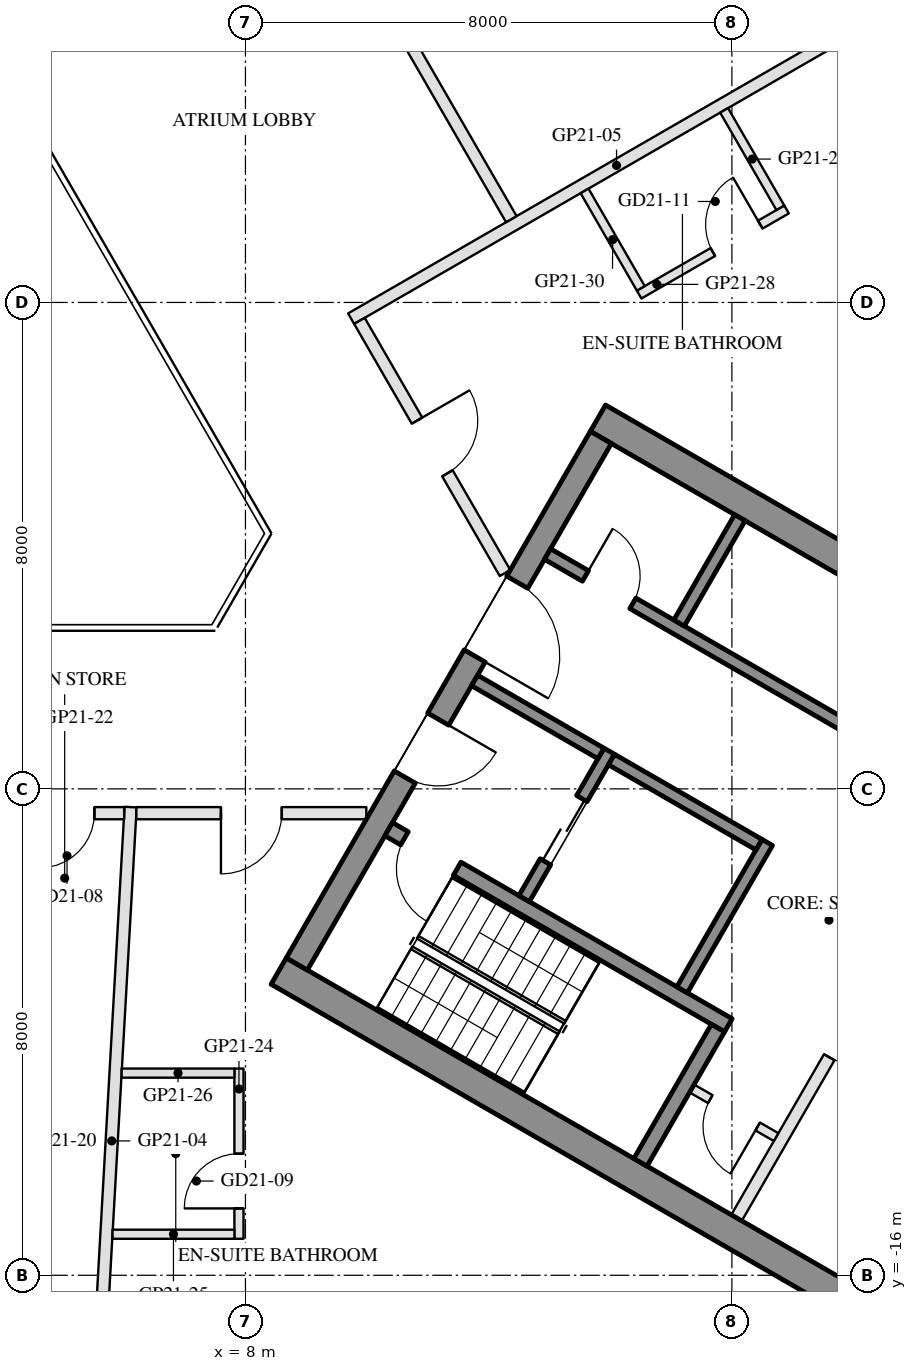
"""IFC4 building model, lengths in metres.
Left out: names, types, materials, properties, quantities, classifications, styles, units other than length and angle.
Written with IfcOpenShell. Run it as: python <this file> out.ifc"""

import sys

from ifc_helpers import new_model, si_unit, direction, frame, frame_2d, origin, place, context, subcontext, project, spatial, rectangle, extrude, element, fill, save


model = new_model("IFC4")
c1 = context("Model", 3, precision=1e-05, world=origin(), true_north=direction((0.0, 1.0)))
c2 = subcontext(c1, "Body", "Model", "MODEL_VIEW")
j1 = project(units=[si_unit("LENGTHUNIT", "METRE"), si_unit("PLANEANGLEUNIT", "RADIAN")], contexts=[c1])
p1 = place(None, origin())
s1 = spatial("IfcSite", under=j1, at=p1, CompositionType="ELEMENT")
p2 = place(p1, origin())
s2 = spatial("IfcBuilding", under=s1, at=p2, CompositionType="ELEMENT")
p3 = place(p2, frame((0.0, 0.0, 216.9)))
s3 = spatial("IfcBuildingStorey", under=s2, at=p3, CompositionType="ELEMENT", Elevation=216.9)
p4 = place(p3, frame((19.729, 2.938, 0.0), z_axis=(0.0, 0.0, 1.0), x_axis=(-0.499976430342, 0.866039011305, 0.0)))
e1 = element("IfcWall", 1, at=p4, inside=s3, PredefinedType="SOLIDWALL", context=c2, shape_type="SweptSolid", body=[
    extrude(rectangle(XDim=6.74, YDim=0.35, at=frame_2d((3.37, 0.0))), origin(), (0.0, 0.0, 1.0), 3.55),
])
p5 = place(p4, frame((0.77, 0.0, 0.3)))
e2 = element("IfcOpeningElement", 2, at=p5, cuts=e1, PredefinedType="OPENING", context=c2, shape_type="SweptSolid", body=[
    extrude(rectangle(XDim=0.9, YDim=2.65, at=frame_2d((0.45, 1.325))), frame((0.0, 0.185, 0.0), z_axis=(0.0, -1.0, 0.0), x_axis=(1.0, 0.0, 0.0)), (0.0, 0.0, 1.0), 0.37),
])
p6 = place(p4, frame((3.12, 0.0, 0.0)))
e3 = element("IfcOpeningElement", 3, at=p6, cuts=e1, PredefinedType="OPENING", context=c2, shape_type="SweptSolid", body=[
    extrude(rectangle(XDim=2.4, YDim=2.4, at=frame_2d((1.2, 1.2))), frame((0.0, 0.185, 0.0), z_axis=(0.0, -1.0, 0.0), x_axis=(1.0, 0.0, 0.0)), (0.0, 0.0, 1.0), 0.37),
])
for number, where, z_axis, x_axis in (
    (4, (8.547, -10.997, 0.0), (0.0, 0.0, 1.0), (0.866, -0.5, 0.0)),
    (5, (13.797, -1.903, 0.0), (0.0, 0.0, 1.0), (0.866, -0.5, 0.0)),
):
    element("IfcWall", number, at=place(p3, frame(where, z_axis=z_axis, x_axis=x_axis)), inside=s3, PredefinedType="SHEAR", context=c2, shape_type="SweptSolid", body=[
        extrude(rectangle(XDim=14.837, YDim=0.5, at=frame_2d((7.418, 0.0))), origin(), (0.0, 0.0, 1.0), 3.5),
    ])
p7 = place(p3, frame((8.845, -10.88, 0.0), z_axis=(0.0, 0.0, 1.0), x_axis=(0.500004234368, 0.866022959057, 0.0)))
e6 = element("IfcWall", 6, at=p7, inside=s3, PredefinedType="SHEAR", context=c2, shape_type="SweptSolid", body=[
    extrude(rectangle(XDim=10.0, YDim=0.4, at=frame_2d((5.0, 0.0))), origin(), (0.0, 0.0, 1.0), 3.5),
])
p8 = place(p7, frame((3.55, 0.0, 0.0)))
e7 = element("IfcOpeningElement", 7, at=p8, cuts=e6, PredefinedType="OPENING", context=c2, shape_type="SweptSolid", body=[
    extrude(rectangle(XDim=1.1, YDim=2.1, at=frame_2d((0.55, 1.05))), frame((0.0, 0.21, 0.0), z_axis=(0.0, -1.0, 0.0), x_axis=(1.0, 0.0, 0.0)), (0.0, 0.0, 1.0), 0.42),
])
p9 = place(p7, frame((5.85, 0.0, 0.0)))
e8 = element("IfcOpeningElement", 8, at=p9, cuts=e6, PredefinedType="OPENING", context=c2, shape_type="SweptSolid", body=[
    extrude(rectangle(XDim=1.4, YDim=2.1, at=frame_2d((0.7, 1.05))), frame((0.0, 0.21, 0.0), z_axis=(0.0, -1.0, 0.0), x_axis=(1.0, 0.0, 0.0)), (0.0, 0.0, 1.0), 0.42),
])
p10 = place(p3, frame((10.356, -8.664, 0.0), z_axis=(0.0, 0.0, 1.0), x_axis=(0.866028629588, -0.499994412703, 0.0)))
e9 = element("IfcWall", 9, at=p10, inside=s3, PredefinedType="SHEAR", context=c2, shape_type="SweptSolid", body=[
    extrude(rectangle(XDim=6.45, YDim=0.25, at=frame_2d((3.225, 0.0))), origin(), (0.0, 0.0, 1.0), 3.5),
])
p11 = place(p10, frame((0.3, 0.0, 0.0)))
e10 = element("IfcOpeningElement", 10, at=p11, cuts=e9, PredefinedType="OPENING", context=c2, shape_type="SweptSolid", body=[
    extrude(rectangle(XDim=1.0, YDim=2.1, at=frame_2d((0.5, 1.05))), frame((0.0, 0.135, 0.0), z_axis=(0.0, -1.0, 0.0), x_axis=(1.0, 0.0, 0.0)), (0.0, 0.0, 1.0), 0.27),
])
p12 = place(p3, frame((14.496, -14.143, 0.0), z_axis=(0.0, 0.0, 1.0), x_axis=(0.500062241894, 0.865989465428, 0.0)))
e11 = element("IfcWall", 11, at=p12, inside=s3, PredefinedType="SHEAR", context=c2, shape_type="SweptSolid", body=[
    extrude(rectangle(XDim=2.55, YDim=0.25, at=frame_2d((1.275, 0.0))), origin(), (0.0, 0.0, 1.0), 3.5),
])
p13 = place(p3, frame((15.181, -11.305, 0.0), z_axis=(0.0, 0.0, 1.0), x_axis=(0.49994636267, 0.866056369097, 0.0)))
e12 = element("IfcWall", 12, at=p13, inside=s3, PredefinedType="SHEAR", context=c2, shape_type="SweptSolid", body=[
    extrude(rectangle(XDim=2.8, YDim=0.2, at=frame_2d((1.4, 0.0))), origin(), (0.0, 0.0, 1.0), 3.5),
])
p14 = place(p3, frame((12.583, -9.805, 0.0), z_axis=(0.0, 0.0, 1.0), x_axis=(0.49994636267, 0.866056369097, 0.0)))
e13 = element("IfcWall", 13, at=p14, inside=s3, PredefinedType="SHEAR", context=c2, shape_type="SweptSolid", body=[
    extrude(rectangle(XDim=2.8, YDim=0.2, at=frame_2d((1.4, 0.0))), origin(), (0.0, 0.0, 1.0), 3.5),
])
p15 = place(p14, frame((0.7, 0.0, 0.0)))
e14 = element("IfcOpeningElement", 14, at=p15, cuts=e13, PredefinedType="OPENING", context=c2, shape_type="SweptSolid", body=[
    extrude(rectangle(XDim=1.2, YDim=2.1, at=frame_2d((0.6, 1.05))), frame((0.0, 0.11, 0.0), z_axis=(0.0, -1.0, 0.0), x_axis=(1.0, 0.0, 0.0)), (0.0, 0.0, 1.0), 0.22),
])
p16 = place(p3, frame((11.768, -6.217, 0.0), z_axis=(0.0, 0.0, 1.0), x_axis=(0.866050077142, -0.499957262057, 0.0)))
e15 = element("IfcWall", 15, at=p16, inside=s3, PredefinedType="SHEAR", context=c2, shape_type="SweptSolid", body=[
    extrude(rectangle(XDim=2.4, YDim=0.2, at=frame_2d((1.2, 0.0))), origin(), (0.0, 0.0, 1.0), 3.5),
])
p17 = place(p3, frame((14.02, -7.517, 0.0), z_axis=(0.0, 0.0, 1.0), x_axis=(0.866034573852, -0.49998411664, 0.0)))
e16 = element("IfcWall", 16, at=p17, inside=s3, PredefinedType="SHEAR", context=c2, shape_type="SweptSolid", body=[
    extrude(rectangle(XDim=2.8, YDim=0.2, at=frame_2d((1.4, 0.0))), origin(), (0.0, 0.0, 1.0), 3.5),
])
p18 = place(p3, frame((12.968, -4.138, 0.0), z_axis=(0.0, 0.0, 1.0), x_axis=(0.866028328073, -0.49999493495, 0.0)))
e17 = element("IfcWall", 17, at=p18, inside=s3, PredefinedType="SHEAR", context=c2, shape_type="SweptSolid", body=[
    extrude(rectangle(XDim=10.16, YDim=0.2, at=frame_2d((5.08, 0.0))), origin(), (0.0, 0.0, 1.0), 3.5),
])
p19 = place(p18, frame((0.72, 0.0, 0.0)))
e18 = element("IfcOpeningElement", 18, at=p19, cuts=e17, PredefinedType="OPENING", context=c2, shape_type="SweptSolid", body=[
    extrude(rectangle(XDim=0.9, YDim=2.1, at=frame_2d((0.45, 1.05))), frame((0.0, 0.11, 0.0), z_axis=(0.0, -1.0, 0.0), x_axis=(1.0, 0.0, 0.0)), (0.0, 0.0, 1.0), 0.22),
])
p20 = place(p18, frame((5.8, 0.0, 0.0)))
e19 = element("IfcOpeningElement", 19, at=p20, cuts=e17, PredefinedType="OPENING", context=c2, shape_type="SweptSolid", body=[
    extrude(rectangle(XDim=0.9, YDim=2.1, at=frame_2d((0.45, 1.05))), frame((0.0, 0.11, 0.0), z_axis=(0.0, -1.0, 0.0), x_axis=(1.0, 0.0, 0.0)), (0.0, 0.0, 1.0), 0.22),
])
p21 = place(p3, frame((15.131, -5.272, 0.0), z_axis=(0.0, 0.0, 1.0), x_axis=(0.499972520799, 0.866041268327, 0.0)))
e20 = element("IfcWall", 20, at=p21, inside=s3, PredefinedType="SHEAR", context=c2, shape_type="SweptSolid", body=[
    extrude(rectangle(XDim=2.0, YDim=0.2, at=frame_2d((1.0, 0.0))), origin(), (0.0, 0.0, 1.0), 3.5),
])
p22 = place(p3, frame((16.076, -15.055, 0.0), z_axis=(0.0, 0.0, 1.0), x_axis=(0.499995103361, 0.866028230842, 0.0)))
e21 = element("IfcWall", 21, at=p22, inside=s3, PredefinedType="PARTITIONING", context=c2, shape_type="SweptSolid", body=[
    extrude(rectangle(XDim=5.4, YDim=0.2, at=frame_2d((2.7, 0.0))), origin(), (0.0, 0.0, 1.0), 3.5),
])
p23 = place(p22, frame((3.05, 0.0, 0.0)))
e22 = element("IfcOpeningElement", 22, at=p23, cuts=e21, PredefinedType="OPENING", context=c2, shape_type="SweptSolid", body=[
    extrude(rectangle(XDim=0.9, YDim=2.1, at=frame_2d((0.45, 1.05))), frame((0.0, 0.11, 0.0), z_axis=(0.0, -1.0, 0.0), x_axis=(1.0, 0.0, 0.0)), (0.0, 0.0, 1.0), 0.22),
])
p24 = place(p3, frame((15.342, -12.928, 0.0), z_axis=(0.0, 0.0, 1.0), x_axis=(0.865989903783, -0.500061482766, 0.0)))
e23 = element("IfcWall", 23, at=p24, inside=s3, PredefinedType="PARTITIONING", context=c2, shape_type="SweptSolid", body=[
    extrude(rectangle(XDim=1.6, YDim=0.15, at=frame_2d((0.8, 0.0))), origin(), (0.0, 0.0, 1.0), 3.5),
])
p25 = place(p24, frame((0.35, 0.0, 0.0)))
e24 = element("IfcOpeningElement", 24, at=p25, cuts=e23, PredefinedType="OPENING", context=c2, shape_type="SweptSolid", body=[
    extrude(rectangle(XDim=0.9, YDim=2.1, at=frame_2d((0.45, 1.05))), frame((0.0, 0.085, 0.0), z_axis=(0.0, -1.0, 0.0), x_axis=(1.0, 0.0, 0.0)), (0.0, 0.0, 1.0), 0.17),
])
p26 = place(p3, frame((5.49, -19.28, 0.0), z_axis=(0.0, 0.0, 1.0), x_axis=(0.056497863711, 0.998402720046, 0.0)))
e25 = element("IfcWall", 25, at=p26, inside=s3, PredefinedType="PARTITIONING", context=c2, shape_type="SweptSolid", body=[
    extrude(rectangle(XDim=10.998, YDim=0.2, at=frame_2d((5.499, 0.0))), origin(), (0.0, 0.0, 1.0), 3.06),
])
p27 = place(p3, frame((18.468, 4.773, 0.0), z_axis=(0.0, 0.0, 1.0), x_axis=(-0.866033125095, -0.499986626058, 0.0)))
e26 = element("IfcWall", 26, at=p27, inside=s3, PredefinedType="PARTITIONING", context=c2, shape_type="SweptSolid", body=[
    extrude(rectangle(XDim=10.08, YDim=0.2, at=frame_2d((5.04, 0.0))), origin(), (0.0, 0.0, 1.0), 3.06),
])
p28 = place(p3, frame((6.006, -8.4, 0.0), z_axis=(0.0, 0.0, 1.0), x_axis=(-1.0, 0.0, 0.0)))
e27 = element("IfcWall", 27, at=p28, inside=s3, PredefinedType="PARTITIONING", context=c2, shape_type="SweptSolid", body=[
    extrude(rectangle(XDim=1.879, YDim=0.2, at=frame_2d((0.939, 0.0))), origin(), (0.0, 0.0, 1.0), 3.55),
])
p29 = place(p28, frame((0.49, 0.0, 0.0)))
e28 = element("IfcOpeningElement", 28, at=p29, cuts=e27, PredefinedType="OPENING", context=c2, shape_type="SweptSolid", body=[
    extrude(rectangle(XDim=0.9, YDim=2.1, at=frame_2d((0.45, 1.05))), frame((0.0, 0.11, 0.0), z_axis=(0.0, -1.0, 0.0), x_axis=(1.0, 0.0, 0.0)), (0.0, 0.0, 1.0), 0.22),
])
p30 = place(p3, frame((9.988, -8.4, 0.0), z_axis=(0.0, 0.0, 1.0), x_axis=(-1.0, 0.0, 0.0)))
e29 = element("IfcWall", 29, at=p30, inside=s3, PredefinedType="PARTITIONING", context=c2, shape_type="SweptSolid", body=[
    extrude(rectangle(XDim=3.782, YDim=0.2, at=frame_2d((1.891, 0.0))), origin(), (0.0, 0.0, 1.0), 2.95),
])
p31 = place(p30, frame((1.391, 0.0, 0.0)))
e30 = element("IfcOpeningElement", 30, at=p31, cuts=e29, PredefinedType="OPENING", context=c2, shape_type="SweptSolid", body=[
    extrude(rectangle(XDim=1.0, YDim=2.1, at=frame_2d((0.5, 1.05))), frame((0.0, 0.11, 0.0), z_axis=(0.0, -1.0, 0.0), x_axis=(1.0, 0.0, 0.0)), (0.0, 0.0, 1.0), 0.22),
])
p32 = place(p3, frame((7.893, -15.4, 0.0), z_axis=(0.0, 0.0, 1.0), x_axis=(0.0, 1.0, 0.0)))
e31 = element("IfcWall", 31, at=p32, inside=s3, PredefinedType="PARTITIONING", context=c2, shape_type="SweptSolid", body=[
    extrude(rectangle(XDim=2.8, YDim=0.15, at=frame_2d((1.4, 0.0))), origin(), (0.0, 0.0, 1.0), 2.95),
])
p33 = place(p32, frame((0.5, 0.0, 0.0)))
e32 = element("IfcOpeningElement", 32, at=p33, cuts=e31, PredefinedType="OPENING", context=c2, shape_type="SweptSolid", body=[
    extrude(rectangle(XDim=0.9, YDim=2.1, at=frame_2d((0.45, 1.05))), frame((0.0, 0.085, 0.0), z_axis=(0.0, -1.0, 0.0), x_axis=(1.0, 0.0, 0.0)), (0.0, 0.0, 1.0), 0.17),
])
p34 = place(p3, frame((5.814, -15.325, 0.0), z_axis=(0.0, 0.0, 1.0), x_axis=(1.0, 0.0, 0.0)))
e33 = element("IfcWall", 33, at=p34, inside=s3, PredefinedType="PARTITIONING", context=c2, shape_type="SweptSolid", body=[
    extrude(rectangle(XDim=2.004, YDim=0.15, at=frame_2d((1.002, 0.0))), origin(), (0.0, 0.0, 1.0), 2.95),
])
p35 = place(p3, frame((5.964, -12.675, 0.0), z_axis=(0.0, 0.0, 1.0), x_axis=(1.0, 0.0, 0.0)))
e34 = element("IfcWall", 34, at=p35, inside=s3, PredefinedType="PARTITIONING", context=c2, shape_type="SweptSolid", body=[
    extrude(rectangle(XDim=1.854, YDim=0.15, at=frame_2d((0.927, 0.0))), origin(), (0.0, 0.0, 1.0), 2.95),
])
p36 = place(p3, frame((9.875, -0.303, 0.0), z_axis=(0.0, 0.0, 1.0), x_axis=(0.500026984917, -0.866009823475, 0.0)))
e35 = element("IfcWall", 35, at=p36, inside=s3, PredefinedType="PARTITIONING", context=c2, shape_type="SweptSolid", body=[
    extrude(rectangle(XDim=4.788, YDim=0.2, at=frame_2d((2.394, 0.0))), origin(), (0.0, 0.0, 1.0), 2.95),
])
p37 = place(p36, frame((1.894, 0.0, 0.0)))
e36 = element("IfcOpeningElement", 36, at=p37, cuts=e35, PredefinedType="OPENING", context=c2, shape_type="SweptSolid", body=[
    extrude(rectangle(XDim=1.0, YDim=2.1, at=frame_2d((0.5, 1.05))), frame((0.0, 0.11, 0.0), z_axis=(0.0, -1.0, 0.0), x_axis=(1.0, 0.0, 0.0)), (0.0, 0.0, 1.0), 0.22),
])
p38 = place(p3, frame((14.474, 0.13, 0.0), z_axis=(0.0, 0.0, 1.0), x_axis=(0.866056369097, 0.49994636267, 0.0)))
e37 = element("IfcWall", 37, at=p38, inside=s3, PredefinedType="PARTITIONING", context=c2, shape_type="SweptSolid", body=[
    extrude(rectangle(XDim=2.8, YDim=0.15, at=frame_2d((1.4, 0.0))), origin(), (0.0, 0.0, 1.0), 3.55),
])
p39 = place(p38, frame((1.4, 0.0, 0.0)))
e38 = element("IfcOpeningElement", 38, at=p39, cuts=e37, PredefinedType="OPENING", context=c2, shape_type="SweptSolid", body=[
    extrude(rectangle(XDim=0.9, YDim=2.1, at=frame_2d((0.45, 1.05))), frame((0.0, 0.085, 0.0), z_axis=(0.0, -1.0, 0.0), x_axis=(1.0, 0.0, 0.0)), (0.0, 0.0, 1.0), 0.17),
])
for number, where, z_axis, x_axis in (
    (39, (16.797, 1.557, 0.0), (0.0, 0.0, 1.0), (-0.5, 0.866, 0.0)),
    (40, (14.502, 0.232, 0.0), (0.0, 0.0, 1.0), (-0.5, 0.866, 0.0)),
):
    element("IfcWall", number, at=place(p3, frame(where, z_axis=z_axis, x_axis=x_axis)), inside=s3, PredefinedType="PARTITIONING", context=c2, shape_type="SweptSolid", body=[
        extrude(rectangle(XDim=1.85, YDim=0.15, at=frame_2d((0.925, 0.0))), origin(), (0.0, 0.0, 1.0), 3.55),
    ])
p40 = place(p3, frame((6.873, 10.896, 0.0), z_axis=(0.0, 0.0, 1.0), x_axis=(0.499996545922, -0.866027397988, 0.0)))
e41 = element("IfcWall", 41, at=p40, inside=s3, PredefinedType="PARTITIONING", context=c2, shape_type="SweptSolid", body=[
    extrude(rectangle(XDim=11.0, YDim=0.2, at=frame_2d((5.5, 0.0))), origin(), (0.0, 0.0, 1.0), 2.95),
])
p41 = place(p40, frame((2.45, 0.0, 0.0)))
e42 = element("IfcOpeningElement", 42, at=p41, cuts=e41, PredefinedType="OPENING", context=c2, shape_type="SweptSolid", body=[
    extrude(rectangle(XDim=1.0, YDim=2.1, at=frame_2d((0.5, 1.05))), frame((0.0, 0.11, 0.0), z_axis=(0.0, -1.0, 0.0), x_axis=(1.0, 0.0, 0.0)), (0.0, 0.0, 1.0), 0.22),
])
p42 = place(p15, origin())
e43 = element("IfcDoor", 43, at=p42, inside=s3, OperationType="DOUBLE_DOOR_SLIDING", PredefinedType="DOOR", context=c2, shape_type="SweptSolid", body=[
    extrude(rectangle(XDim=1.2, YDim=2.1, at=frame_2d((0.6, 1.05))), frame((0.0, 0.025, 0.0), z_axis=(0.0, -1.0, 0.0), x_axis=(1.0, 0.0, 0.0)), (0.0, 0.0, 1.0), 0.05),
])
fill(e14, e43)
p43 = place(p25, frame((0.9, 0.0, 0.0), z_axis=(0.0, 0.0, 1.0), x_axis=(-1.0, 0.0, 0.0)))
e44 = element("IfcDoor", 44, at=p43, inside=s3, OperationType="SINGLE_SWING_LEFT", PredefinedType="DOOR", context=c2, shape_type="SweptSolid", body=[
    extrude(rectangle(XDim=0.9, YDim=2.1, at=frame_2d((0.45, 1.05))), frame((0.0, 0.025, 0.0), z_axis=(0.0, -1.0, 0.0), x_axis=(1.0, 0.0, 0.0)), (0.0, 0.0, 1.0), 0.05),
])
fill(e24, e44)
p44 = place(p19, origin())
e45 = element("IfcDoor", 45, at=p44, inside=s3, OperationType="SINGLE_SWING_LEFT", PredefinedType="DOOR", context=c2, shape_type="SweptSolid", body=[
    extrude(rectangle(XDim=0.9, YDim=2.1, at=frame_2d((0.45, 1.05))), frame((0.0, 0.025, 0.0), z_axis=(0.0, -1.0, 0.0), x_axis=(1.0, 0.0, 0.0)), (0.0, 0.0, 1.0), 0.05),
])
fill(e18, e45)
p45 = place(p23, frame((0.9, 0.0, 0.0), z_axis=(0.0, 0.0, 1.0), x_axis=(-1.0, 0.0, 0.0)))
e46 = element("IfcDoor", 46, at=p45, inside=s3, OperationType="SINGLE_SWING_LEFT", PredefinedType="DOOR", context=c2, shape_type="SweptSolid", body=[
    extrude(rectangle(XDim=0.9, YDim=2.1, at=frame_2d((0.45, 1.05))), frame((0.0, 0.025, 0.0), z_axis=(0.0, -1.0, 0.0), x_axis=(1.0, 0.0, 0.0)), (0.0, 0.0, 1.0), 0.05),
])
fill(e22, e46)
p46 = place(p8, frame((1.1, 0.0, 0.0), z_axis=(0.0, 0.0, 1.0), x_axis=(-1.0, 0.0, 0.0)))
e47 = element("IfcDoor", 47, at=p46, inside=s3, OperationType="SINGLE_SWING_LEFT", PredefinedType="DOOR", context=c2, shape_type="SweptSolid", body=[
    extrude(rectangle(XDim=1.1, YDim=2.1, at=frame_2d((0.55, 1.05))), frame((0.0, 0.025, 0.0), z_axis=(0.0, -1.0, 0.0), x_axis=(1.0, 0.0, 0.0)), (0.0, 0.0, 1.0), 0.05),
])
fill(e7, e47)
p47 = place(p9, frame((1.4, 0.0, 0.0), z_axis=(0.0, 0.0, 1.0), x_axis=(-1.0, 0.0, 0.0)))
e48 = element("IfcDoor", 48, at=p47, inside=s3, OperationType="DOUBLE_DOOR_SINGLE_SWING", PredefinedType="DOOR", context=c2, shape_type="SweptSolid", body=[
    extrude(rectangle(XDim=1.4, YDim=2.1, at=frame_2d((0.7, 1.05))), frame((0.0, 0.025, 0.0), z_axis=(0.0, -1.0, 0.0), x_axis=(1.0, 0.0, 0.0)), (0.0, 0.0, 1.0), 0.05),
])
fill(e8, e48)
p48 = place(p11, frame((1.0, 0.0, 0.0), z_axis=(0.0, 0.0, 1.0), x_axis=(-1.0, 0.0, 0.0)))
e49 = element("IfcDoor", 49, at=p48, inside=s3, OperationType="SINGLE_SWING_LEFT", PredefinedType="DOOR", context=c2, shape_type="SweptSolid", body=[
    extrude(rectangle(XDim=1.0, YDim=2.1, at=frame_2d((0.5, 1.05))), frame((0.0, 0.025, 0.0), z_axis=(0.0, -1.0, 0.0), x_axis=(1.0, 0.0, 0.0)), (0.0, 0.0, 1.0), 0.05),
])
fill(e10, e49)
p49 = place(p29, origin())
e50 = element("IfcDoor", 50, at=p49, inside=s3, OperationType="SINGLE_SWING_RIGHT", PredefinedType="DOOR", context=c2, shape_type="SweptSolid", body=[
    extrude(rectangle(XDim=0.9, YDim=2.1, at=frame_2d((0.45, 1.05))), frame((0.0, 0.025, 0.0), z_axis=(0.0, -1.0, 0.0), x_axis=(1.0, 0.0, 0.0)), (0.0, 0.0, 1.0), 0.05),
])
fill(e28, e50)
p50 = place(p33, origin())
e51 = element("IfcDoor", 51, at=p50, inside=s3, OperationType="SINGLE_SWING_LEFT", PredefinedType="DOOR", context=c2, shape_type="SweptSolid", body=[
    extrude(rectangle(XDim=0.9, YDim=2.1, at=frame_2d((0.45, 1.05))), frame((0.0, 0.025, 0.0), z_axis=(0.0, -1.0, 0.0), x_axis=(1.0, 0.0, 0.0)), (0.0, 0.0, 1.0), 0.05),
])
fill(e32, e51)
p51 = place(p31, origin())
e52 = element("IfcDoor", 52, at=p51, inside=s3, OperationType="SINGLE_SWING_RIGHT", PredefinedType="DOOR", context=c2, shape_type="SweptSolid", body=[
    extrude(rectangle(XDim=1.0, YDim=2.1, at=frame_2d((0.5, 1.05))), frame((0.0, 0.025, 0.0), z_axis=(0.0, -1.0, 0.0), x_axis=(1.0, 0.0, 0.0)), (0.0, 0.0, 1.0), 0.05),
])
fill(e30, e52)
p52 = place(p39, origin())
e53 = element("IfcDoor", 53, at=p52, inside=s3, OperationType="SINGLE_SWING_RIGHT", PredefinedType="DOOR", context=c2, shape_type="SweptSolid", body=[
    extrude(rectangle(XDim=0.9, YDim=2.1, at=frame_2d((0.45, 1.05))), frame((0.0, 0.025, 0.0), z_axis=(0.0, -1.0, 0.0), x_axis=(1.0, 0.0, 0.0)), (0.0, 0.0, 1.0), 0.05),
])
fill(e38, e53)
p53 = place(p37, origin())
e54 = element("IfcDoor", 54, at=p53, inside=s3, OperationType="SINGLE_SWING_LEFT", PredefinedType="DOOR", context=c2, shape_type="SweptSolid", body=[
    extrude(rectangle(XDim=1.0, YDim=2.1, at=frame_2d((0.5, 1.05))), frame((0.0, 0.025, 0.0), z_axis=(0.0, -1.0, 0.0), x_axis=(1.0, 0.0, 0.0)), (0.0, 0.0, 1.0), 0.05),
])
fill(e36, e54)
save(model, sys.argv[1])
